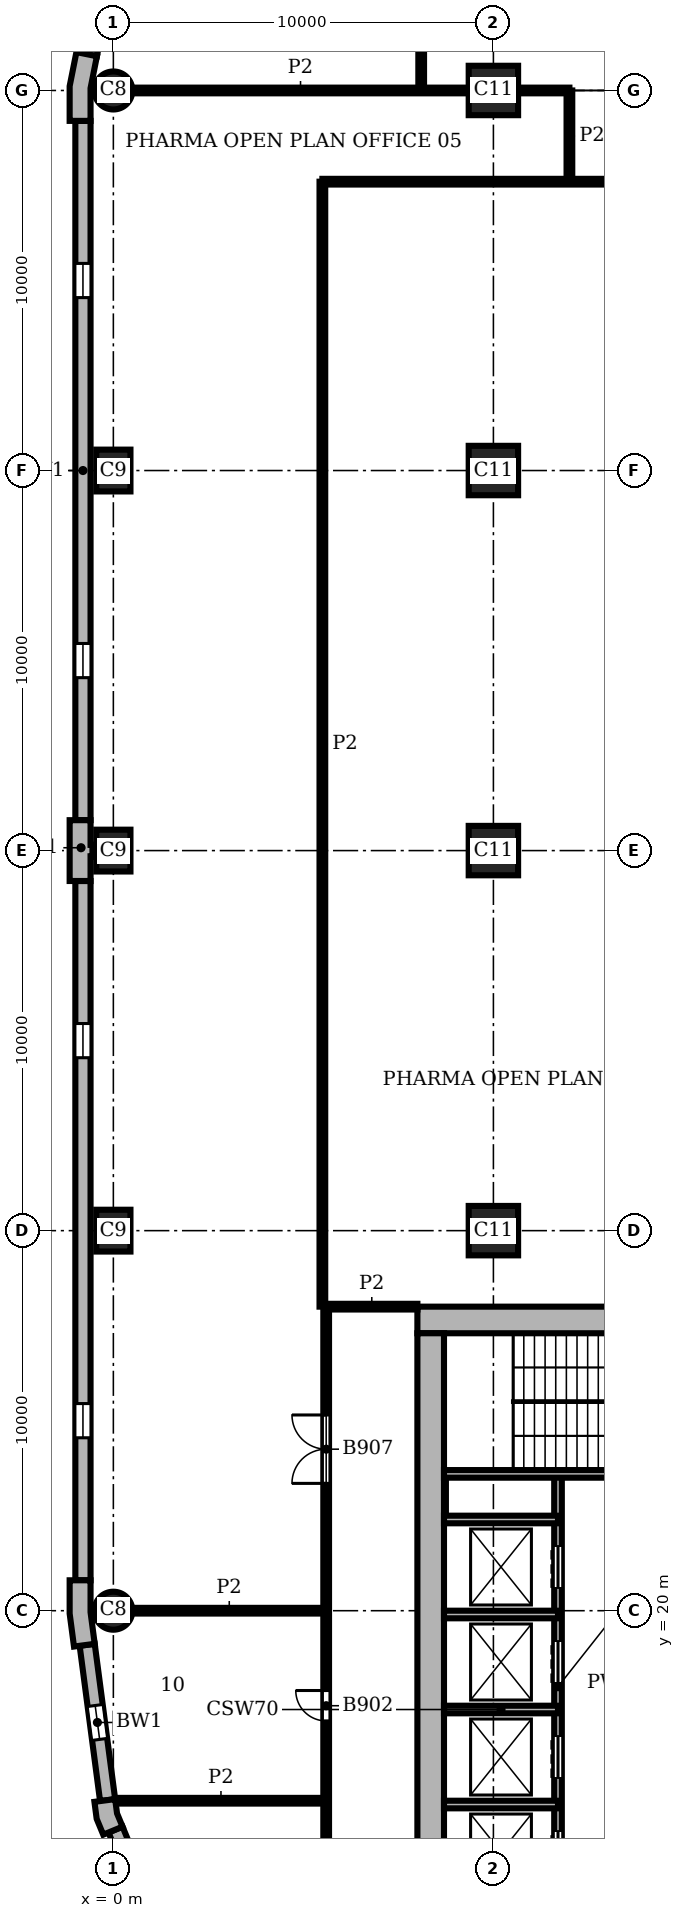
"""IFC4 building model, lengths in metres.
Left out: names, types, materials, properties, quantities, classifications, styles, units other than length and angle.
Written with IfcOpenShell. Run it as: python <this file> out.ifc"""

import sys

from ifc_helpers import new_model, si_unit, direction, frame, frame_2d, origin, origin_2d, place, context, subcontext, project, spatial, polyline, rectangle, circle, outline, extrude, element, fill, save


model = new_model("IFC4")
c1 = context("Model", 3, precision=1e-05, world=origin(), true_north=direction((0.0, 1.0)))
c2 = subcontext(c1, "Body", "Model", "MODEL_VIEW")
j1 = project(units=[si_unit("LENGTHUNIT", "METRE"), si_unit("PLANEANGLEUNIT", "RADIAN")], contexts=[c1])
p1 = place(None, origin())
s1 = spatial("IfcSite", under=j1, at=p1, CompositionType="ELEMENT")
p2 = place(p1, origin())
s2 = spatial("IfcBuilding", under=s1, at=p2, CompositionType="ELEMENT")
p3 = place(p2, frame((0.0, 0.0, 225.3)))
s3 = spatial("IfcBuildingStorey", under=s2, at=p3, CompositionType="ELEMENT", Elevation=225.3)
p4 = place(p3, frame((0.0, 60.0, 0.0), z_axis=(0.0, 0.0, 1.0), x_axis=(1.0, 0.0, 0.0)))
e1 = element("IfcColumn", 1, at=p4, inside=s3, PredefinedType="COLUMN", context=c2, shape_type="SweptSolid", body=[
    extrude(circle(Radius=0.5, at=origin_2d()), origin(), (0.0, 0.0, 1.0), 3.9),
])
for number, where, z_axis, x_axis in (
    (2, (0.0, 50.0, 0.0), (0.0, 0.0, 1.0), (0.0, 1.0, 0.0)),
    (3, (0.0, 40.0, 0.0), (0.0, 0.0, 1.0), (0.0, 1.0, 0.0)),
    (4, (0.0, 30.0, 0.0), (0.0, 0.0, 1.0), (0.0, 1.0, 0.0)),
):
    element("IfcColumn", number, at=place(p3, frame(where, z_axis=z_axis, x_axis=x_axis)), inside=s3, PredefinedType="COLUMN", context=c2, shape_type="SweptSolid", body=[
        extrude(rectangle(XDim=1.1, YDim=0.9, at=origin_2d()), origin(), (0.0, 0.0, 1.0), 3.9),
    ])
p5 = place(p3, frame((0.0, 20.0, 0.0), z_axis=(0.0, 0.0, 1.0), x_axis=(1.0, 0.0, 0.0)))
e5 = element("IfcColumn", 5, at=p5, inside=s3, PredefinedType="COLUMN", context=c2, shape_type="SweptSolid", body=[
    extrude(circle(Radius=0.5, at=origin_2d()), origin(), (0.0, 0.0, 1.0), 3.9),
])
for number, where, z_axis, x_axis in (
    (6, (10.0, 30.0, 0.0), (0.0, 0.0, 1.0), (1.0, 0.0, 0.0)),
    (7, (10.0, 40.0, 0.0), (0.0, 0.0, 1.0), (1.0, 0.0, 0.0)),
    (8, (10.0, 50.0, 0.0), (0.0, 0.0, 1.0), (1.0, 0.0, 0.0)),
    (9, (10.0, 60.0, 0.0), (0.0, 0.0, 1.0), (1.0, 0.0, 0.0)),
):
    element("IfcColumn", number, at=place(p3, frame(where, z_axis=z_axis, x_axis=x_axis)), inside=s3, PredefinedType="COLUMN", context=c2, shape_type="SweptSolid", body=[
        extrude(rectangle(XDim=1.3, YDim=1.3, at=origin_2d()), origin(), (0.0, 0.0, 1.0), 3.9),
    ])
p6 = place(p3, frame((28.0, 27.65, 0.0), z_axis=(0.0, 0.0, 1.0), x_axis=(-1.0, 0.0, 0.0)))
e10 = element("IfcWall", 10, at=p6, inside=s3, PredefinedType="SHEAR", context=c2, shape_type="SweptSolid", body=[
    extrude(rectangle(XDim=20.0, YDim=0.7, at=frame_2d((10.0, 0.0))), origin(), (0.0, 0.0, 1.0), 3.9),
])
p7 = place(p3, frame((8.35, 27.3, 0.0), z_axis=(0.0, 0.0, 1.0), x_axis=(0.0, -1.0, 0.0)))
e11 = element("IfcWall", 11, at=p7, inside=s3, PredefinedType="SHEAR", context=c2, shape_type="SweptSolid", body=[
    extrude(rectangle(XDim=18.6, YDim=0.7, at=frame_2d((9.3, 0.0))), origin(), (0.0, 0.0, 1.0), 3.9),
])
p8 = place(p3, origin())
e12 = element("IfcWall", 12, at=p8, inside=s3, PredefinedType="SOLIDWALL", context=c2, shape_type="SweptSolid", body=[
    extrude(outline(polyline([(-0.825, 60.98), (-0.972, 61.009), (-1.15, 60.113), (-1.15, 59.2), (-1.0, 59.2), (-0.6, 59.2), (-0.6, 60.059), (-0.432, 60.902), (-0.825, 60.98)])), origin(), (0.0, 0.0, 1.0), 3.9),
])
e13 = element("IfcWall", 13, at=p8, inside=s3, PredefinedType="SOLIDWALL", context=c2, shape_type="SweptSolid", body=[
    extrude(outline(polyline([(-0.6, 39.2), (-0.6, 39.85), (-0.55, 39.85), (-0.55, 40.15), (-0.6, 40.15), (-0.6, 40.8), (-1.0, 40.8), (-1.15, 40.8), (-1.15, 40.0), (-1.15, 39.2), (-1.0, 39.2), (-0.6, 39.2)])), origin(), (0.0, 0.0, 1.0), 3.9),
])
e14 = element("IfcWall", 14, at=p8, inside=s3, PredefinedType="SOLIDWALL", context=c2, shape_type="SweptSolid", body=[
    extrude(outline(polyline([(-1.0, 20.8), (-1.15, 20.8), (-1.15, 19.925), (-1.036, 19.057), (-0.887, 19.076), (-0.49, 19.128), (-0.6, 19.961), (-0.6, 20.8), (-1.0, 20.8)])), origin(), (0.0, 0.0, 1.0), 3.9),
])
e15 = element("IfcWall", 15, at=p8, inside=s3, PredefinedType="SOLIDWALL", context=c2, shape_type="SweptSolid", body=[
    extrude(outline(polyline([(-0.349, 14.99), (-0.498, 14.971), (-0.439, 14.523), (-0.266, 14.106), (-0.128, 14.164), (0.242, 14.317), (0.097, 14.667), (0.047, 15.043), (-0.349, 14.99)])), origin(), (0.0, 0.0, 1.0), 3.9),
])
p9 = place(p3, frame((0.299, 65.602, 0.0), z_axis=(0.0, 0.0, 1.0), x_axis=(-0.195098533057, -0.98078364709, 0.0)))
e16 = element("IfcWall", 16, at=p9, inside=s3, PredefinedType="SOLIDWALL", context=c2, shape_type="SweptSolid", body=[
    extrude(rectangle(XDim=4.753, YDim=0.4, at=frame_2d((2.376, 0.0))), origin(), (0.0, 0.0, 1.0), 3.9),
])
p10 = place(p9, frame((0.226, 0.0, 0.9)))
e17 = element("IfcOpeningElement", 17, at=p10, cuts=e16, PredefinedType="OPENING", context=c2, shape_type="SweptSolid", body=[
    extrude(rectangle(XDim=4.3, YDim=2.35, at=frame_2d((2.15, 1.175))), frame((0.0, 0.21, 0.0), z_axis=(0.0, -1.0, 0.0), x_axis=(1.0, 0.0, 0.0)), (0.0, 0.0, 1.0), 0.42),
])
p11 = place(p3, frame((-0.8, 59.2, 0.0), z_axis=(0.0, 0.0, 1.0), x_axis=(0.0, -1.0, 0.0)))
e18 = element("IfcWall", 18, at=p11, inside=s3, PredefinedType="SOLIDWALL", context=c2, shape_type="SweptSolid", body=[
    extrude(rectangle(XDim=18.4, YDim=0.4, at=frame_2d((9.2, 0.0))), origin(), (0.0, 0.0, 1.0), 3.9),
])
p12 = place(p11, frame((3.75, 0.0, 0.9)))
e19 = element("IfcOpeningElement", 19, at=p12, cuts=e18, PredefinedType="OPENING", context=c2, shape_type="SweptSolid", body=[
    extrude(rectangle(XDim=0.9, YDim=2.35, at=frame_2d((0.45, 1.175))), frame((0.0, 0.21, 0.0), z_axis=(0.0, -1.0, 0.0), x_axis=(1.0, 0.0, 0.0)), (0.0, 0.0, 1.0), 0.42),
])
p13 = place(p11, frame((13.75, 0.0, 0.9)))
e20 = element("IfcOpeningElement", 20, at=p13, cuts=e18, PredefinedType="OPENING", context=c2, shape_type="SweptSolid", body=[
    extrude(rectangle(XDim=0.9, YDim=2.35, at=frame_2d((0.45, 1.175))), frame((0.0, 0.21, 0.0), z_axis=(0.0, -1.0, 0.0), x_axis=(1.0, 0.0, 0.0)), (0.0, 0.0, 1.0), 0.42),
])
p14 = place(p3, frame((-0.8, 39.2, 0.0), z_axis=(0.0, 0.0, 1.0), x_axis=(0.0, -1.0, 0.0)))
e21 = element("IfcWall", 21, at=p14, inside=s3, PredefinedType="SOLIDWALL", context=c2, shape_type="SweptSolid", body=[
    extrude(rectangle(XDim=18.4, YDim=0.4, at=frame_2d((9.2, 0.0))), origin(), (0.0, 0.0, 1.0), 3.9),
])
p15 = place(p14, frame((3.75, 0.0, 0.9)))
e22 = element("IfcOpeningElement", 22, at=p15, cuts=e21, PredefinedType="OPENING", context=c2, shape_type="SweptSolid", body=[
    extrude(rectangle(XDim=0.9, YDim=2.35, at=frame_2d((0.45, 1.175))), frame((0.0, 0.21, 0.0), z_axis=(0.0, -1.0, 0.0), x_axis=(1.0, 0.0, 0.0)), (0.0, 0.0, 1.0), 0.42),
])
p16 = place(p14, frame((13.75, 0.0, 0.9)))
e23 = element("IfcOpeningElement", 23, at=p16, cuts=e21, PredefinedType="OPENING", context=c2, shape_type="SweptSolid", body=[
    extrude(rectangle(XDim=0.9, YDim=2.35, at=frame_2d((0.45, 1.175))), frame((0.0, 0.21, 0.0), z_axis=(0.0, -1.0, 0.0), x_axis=(1.0, 0.0, 0.0)), (0.0, 0.0, 1.0), 0.42),
])
p17 = place(p3, frame((-0.689, 19.102, 0.0), z_axis=(0.0, 0.0, 1.0), x_axis=(0.130514280502, -0.991446429508, 0.0)))
e24 = element("IfcWall", 24, at=p17, inside=s3, PredefinedType="SOLIDWALL", context=c2, shape_type="SweptSolid", body=[
    extrude(rectangle(XDim=4.121, YDim=0.4, at=frame_2d((2.061, 0.0))), origin(), (0.0, 0.0, 1.0), 3.9),
])
p18 = place(p17, frame((1.611, 0.0, 0.9)))
e25 = element("IfcOpeningElement", 25, at=p18, cuts=e24, PredefinedType="OPENING", context=c2, shape_type="SweptSolid", body=[
    extrude(rectangle(XDim=0.9, YDim=2.35, at=frame_2d((0.45, 1.175))), frame((0.0, 0.21, 0.0), z_axis=(0.0, -1.0, 0.0), x_axis=(1.0, 0.0, 0.0)), (0.0, 0.0, 1.0), 0.42),
])
p19 = place(p3, frame((0.057, 14.24, 0.0), z_axis=(0.0, 0.0, 1.0), x_axis=(0.382721546029, -0.923863744394, 0.0)))
e26 = element("IfcWall", 26, at=p19, inside=s3, PredefinedType="SOLIDWALL", context=c2, shape_type="SweptSolid", body=[
    extrude(rectangle(XDim=4.121, YDim=0.4, at=frame_2d((2.061, 0.0))), origin(), (0.0, 0.0, 1.0), 3.9),
])
p20 = place(p19, frame((1.611, 0.0, 0.9)))
e27 = element("IfcOpeningElement", 27, at=p20, cuts=e26, PredefinedType="OPENING", context=c2, shape_type="SweptSolid", body=[
    extrude(rectangle(XDim=0.9, YDim=2.35, at=frame_2d((0.45, 1.175))), frame((0.0, 0.21, 0.0), z_axis=(0.0, -1.0, 0.0), x_axis=(1.0, 0.0, 0.0)), (0.0, 0.0, 1.0), 0.42),
])
for number, where, z_axis, x_axis in (
    (28, (8.7, 14.9, 0.0), (0.0, 0.0, 1.0), (1.0, 0.0, 0.0)),
    (29, (8.7, 17.4, 0.0), (0.0, 0.0, 1.0), (1.0, 0.0, 0.0)),
    (30, (8.7, 19.9, 0.0), (0.0, 0.0, 1.0), (1.0, 0.0, 0.0)),
    (31, (8.7, 22.4, 0.0), (0.0, 0.0, 1.0), (1.0, 0.0, 0.0)),
):
    element("IfcWall", number, at=place(p3, frame(where, z_axis=z_axis, x_axis=x_axis)), inside=s3, PredefinedType="SHEAR", context=c2, shape_type="SweptSolid", body=[
        extrude(rectangle(XDim=3.0, YDim=0.2, at=frame_2d((1.5, 0.0))), origin(), (0.0, 0.0, 1.0), 3.58),
    ])
p21 = place(p3, frame((8.7, 23.6, 0.0), z_axis=(0.0, 0.0, 1.0), x_axis=(1.0, 0.0, 0.0)))
e32 = element("IfcWall", 32, at=p21, inside=s3, PredefinedType="SHEAR", context=c2, shape_type="SweptSolid", body=[
    extrude(rectangle(XDim=5.1, YDim=0.2, at=frame_2d((2.55, 0.0))), origin(), (0.0, 0.0, 1.0), 3.58),
])
p22 = place(p3, frame((11.7, 12.4, 0.0), z_axis=(0.0, 0.0, 1.0), x_axis=(0.0, 1.0, 0.0)))
e33 = element("IfcWall", 33, at=p22, inside=s3, PredefinedType="SHEAR", context=c2, shape_type="SweptSolid", body=[
    extrude(rectangle(XDim=11.2, YDim=0.2, at=frame_2d((5.6, 0.0))), origin(), (0.0, 0.0, 1.0), 3.58),
])
p23 = place(p22, frame((0.7, 0.0, 0.0)))
e34 = element("IfcOpeningElement", 34, at=p23, cuts=e33, PredefinedType="OPENING", context=c2, shape_type="SweptSolid", body=[
    extrude(rectangle(XDim=1.1, YDim=2.1, at=frame_2d((0.55, 1.05))), frame((0.0, 0.11, 0.0), z_axis=(0.0, -1.0, 0.0), x_axis=(1.0, 0.0, 0.0)), (0.0, 0.0, 1.0), 0.22),
])
p24 = place(p22, frame((3.2, 0.0, 0.0)))
e35 = element("IfcOpeningElement", 35, at=p24, cuts=e33, PredefinedType="OPENING", context=c2, shape_type="SweptSolid", body=[
    extrude(rectangle(XDim=1.1, YDim=2.1, at=frame_2d((0.55, 1.05))), frame((0.0, 0.11, 0.0), z_axis=(0.0, -1.0, 0.0), x_axis=(1.0, 0.0, 0.0)), (0.0, 0.0, 1.0), 0.22),
])
p25 = place(p22, frame((5.7, 0.0, 0.0)))
e36 = element("IfcOpeningElement", 36, at=p25, cuts=e33, PredefinedType="OPENING", context=c2, shape_type="SweptSolid", body=[
    extrude(rectangle(XDim=1.1, YDim=2.1, at=frame_2d((0.55, 1.05))), frame((0.0, 0.11, 0.0), z_axis=(0.0, -1.0, 0.0), x_axis=(1.0, 0.0, 0.0)), (0.0, 0.0, 1.0), 0.22),
])
p26 = place(p22, frame((8.2, 0.0, 0.0)))
e37 = element("IfcOpeningElement", 37, at=p26, cuts=e33, PredefinedType="OPENING", context=c2, shape_type="SweptSolid", body=[
    extrude(rectangle(XDim=1.1, YDim=2.1, at=frame_2d((0.55, 1.05))), frame((0.0, 0.11, 0.0), z_axis=(0.0, -1.0, 0.0), x_axis=(1.0, 0.0, 0.0)), (0.0, 0.0, 1.0), 0.22),
])
p27 = place(p3, frame((5.5, 28.0, 0.0), z_axis=(0.0, 0.0, 1.0), x_axis=(0.0, 1.0, 0.0)))
e38 = element("IfcWall", 38, at=p27, inside=s3, PredefinedType="PARTITIONING", context=c2, shape_type="SweptSolid", body=[
    extrude(rectangle(XDim=29.6, YDim=0.15, at=frame_2d((14.8, 0.0))), origin(), (0.0, 0.0, 1.0), 3.58),
])
p28 = place(p3, frame((5.6, 5.6, 0.0), z_axis=(0.0, 0.0, 1.0), x_axis=(0.0, 1.0, 0.0)))
e39 = element("IfcWall", 39, at=p28, inside=s3, PredefinedType="PARTITIONING", context=c2, shape_type="SweptSolid", body=[
    extrude(rectangle(XDim=22.4, YDim=0.15, at=frame_2d((11.2, 0.0))), origin(), (0.0, 0.0, 1.0), 3.58),
])
p29 = place(p28, frame((5.35, 0.0, 0.0)))
e40 = element("IfcOpeningElement", 40, at=p29, cuts=e39, PredefinedType="OPENING", context=c2, shape_type="SweptSolid", body=[
    extrude(rectangle(XDim=0.8, YDim=2.1, at=frame_2d((0.4, 1.05))), frame((0.0, 0.085, 0.0), z_axis=(0.0, -1.0, 0.0), x_axis=(1.0, 0.0, 0.0)), (0.0, 0.0, 1.0), 0.17),
])
p30 = place(p28, frame((11.5, 0.0, 0.0)))
e41 = element("IfcOpeningElement", 41, at=p30, cuts=e39, PredefinedType="OPENING", context=c2, shape_type="SweptSolid", body=[
    extrude(rectangle(XDim=0.8, YDim=2.1, at=frame_2d((0.4, 1.05))), frame((0.0, 0.085, 0.0), z_axis=(0.0, -1.0, 0.0), x_axis=(1.0, 0.0, 0.0)), (0.0, 0.0, 1.0), 0.17),
])
p31 = place(p28, frame((17.75, 0.0, 0.0)))
e42 = element("IfcOpeningElement", 42, at=p31, cuts=e39, PredefinedType="OPENING", context=c2, shape_type="SweptSolid", body=[
    extrude(rectangle(XDim=1.8, YDim=2.1, at=frame_2d((0.9, 1.05))), frame((0.0, 0.085, 0.0), z_axis=(0.0, -1.0, 0.0), x_axis=(1.0, 0.0, 0.0)), (0.0, 0.0, 1.0), 0.17),
])
p32 = place(p3, frame((8.1, 60.0, 0.0), z_axis=(0.0, 0.0, 1.0), x_axis=(0.0, 1.0, 0.0)))
e43 = element("IfcWall", 43, at=p32, inside=s3, PredefinedType="PARTITIONING", context=c2, shape_type="SweptSolid", body=[
    extrude(rectangle(XDim=6.4, YDim=0.15, at=frame_2d((3.2, 0.0))), origin(), (0.0, 0.0, 1.0), 3.58),
])
p33 = place(p32, frame((2.35, 0.0, 0.0)))
e44 = element("IfcOpeningElement", 44, at=p33, cuts=e43, PredefinedType="OPENING", context=c2, shape_type="SweptSolid", body=[
    extrude(rectangle(XDim=1.0, YDim=2.1, at=frame_2d((0.5, 1.05))), frame((0.0, 0.085, 0.0), z_axis=(0.0, -1.0, 0.0), x_axis=(1.0, 0.0, 0.0)), (0.0, 0.0, 1.0), 0.17),
])
p34 = place(p3, frame((12.0, 57.6, 0.0), z_axis=(0.0, 0.0, 1.0), x_axis=(0.0, 1.0, 0.0)))
e45 = element("IfcWall", 45, at=p34, inside=s3, PredefinedType="PARTITIONING", context=c2, shape_type="SweptSolid", body=[
    extrude(rectangle(XDim=2.4, YDim=0.15, at=frame_2d((1.2, 0.0))), origin(), (0.0, 0.0, 1.0), 3.58),
])
p35 = place(p3, frame((0.063, 15.0, 0.0), z_axis=(0.0, 0.0, 1.0), x_axis=(1.0, 0.0, 0.0)))
e46 = element("IfcWall", 46, at=p35, inside=s3, PredefinedType="PARTITIONING", context=c2, shape_type="SweptSolid", body=[
    extrude(rectangle(XDim=5.537, YDim=0.15, at=frame_2d((2.769, 0.0))), origin(), (0.0, 0.0, 1.0), 3.58),
])
p36 = place(p3, frame((0.5, 20.0, 0.0), z_axis=(0.0, 0.0, 1.0), x_axis=(1.0, 0.0, 0.0)))
e47 = element("IfcWall", 47, at=p36, inside=s3, PredefinedType="PARTITIONING", context=c2, shape_type="SweptSolid", body=[
    extrude(rectangle(XDim=5.1, YDim=0.15, at=frame_2d((2.55, 0.0))), origin(), (0.0, 0.0, 1.0), 3.58),
])
p37 = place(p3, frame((5.6, 28.0, 0.0), z_axis=(0.0, 0.0, 1.0), x_axis=(1.0, 0.0, 0.0)))
e48 = element("IfcWall", 48, at=p37, inside=s3, PredefinedType="PARTITIONING", context=c2, shape_type="SweptSolid", body=[
    extrude(rectangle(XDim=2.4, YDim=0.15, at=frame_2d((1.2, 0.0))), origin(), (0.0, 0.0, 1.0), 3.58),
])
p38 = place(p3, frame((5.5, 57.6, 0.0), z_axis=(0.0, 0.0, 1.0), x_axis=(1.0, 0.0, 0.0)))
e49 = element("IfcWall", 49, at=p38, inside=s3, PredefinedType="PARTITIONING", context=c2, shape_type="SweptSolid", body=[
    extrude(rectangle(XDim=20.5, YDim=0.15, at=frame_2d((10.25, 0.0))), origin(), (0.0, 0.0, 1.0), 3.58),
])
p39 = place(p38, frame((8.1, 0.0, 0.0)))
e50 = element("IfcOpeningElement", 50, at=p39, cuts=e49, PredefinedType="OPENING", context=c2, shape_type="SweptSolid", body=[
    extrude(rectangle(XDim=1.8, YDim=2.1, at=frame_2d((0.9, 1.05))), frame((0.0, 0.085, 0.0), z_axis=(0.0, -1.0, 0.0), x_axis=(1.0, 0.0, 0.0)), (0.0, 0.0, 1.0), 0.17),
])
p40 = place(p3, frame((0.5, 60.0, 0.0), z_axis=(0.0, 0.0, 1.0), x_axis=(1.0, 0.0, 0.0)))
e51 = element("IfcWall", 51, at=p40, inside=s3, PredefinedType="PARTITIONING", context=c2, shape_type="SweptSolid", body=[
    extrude(rectangle(XDim=8.85, YDim=0.15, at=frame_2d((4.425, 0.0))), origin(), (0.0, 0.0, 1.0), 3.58),
])
p41 = place(p3, frame((10.65, 60.0, 0.0), z_axis=(0.0, 0.0, 1.0), x_axis=(1.0, 0.0, 0.0)))
e52 = element("IfcWall", 52, at=p41, inside=s3, PredefinedType="PARTITIONING", context=c2, shape_type="SweptSolid", body=[
    extrude(rectangle(XDim=1.35, YDim=0.15, at=frame_2d((0.675, 0.0))), origin(), (0.0, 0.0, 1.0), 3.58),
])
p42 = place(p12, origin())
e53 = element("IfcWindow", 53, at=p42, inside=s3, PartitioningType="SINGLE_PANEL", PredefinedType="WINDOW", context=c2, shape_type="SweptSolid", body=[
    extrude(rectangle(XDim=0.9, YDim=2.35, at=frame_2d((0.45, 1.175))), frame((0.0, 0.16, 0.0), z_axis=(0.0, -1.0, 0.0), x_axis=(1.0, 0.0, 0.0)), (0.0, 0.0, 1.0), 0.06),
])
fill(e19, e53)
p43 = place(p13, origin())
e54 = element("IfcWindow", 54, at=p43, inside=s3, PartitioningType="SINGLE_PANEL", PredefinedType="WINDOW", context=c2, shape_type="SweptSolid", body=[
    extrude(rectangle(XDim=0.9, YDim=2.35, at=frame_2d((0.45, 1.175))), frame((0.0, 0.16, 0.0), z_axis=(0.0, -1.0, 0.0), x_axis=(1.0, 0.0, 0.0)), (0.0, 0.0, 1.0), 0.06),
])
fill(e20, e54)
p44 = place(p15, origin())
e55 = element("IfcWindow", 55, at=p44, inside=s3, PartitioningType="SINGLE_PANEL", PredefinedType="WINDOW", context=c2, shape_type="SweptSolid", body=[
    extrude(rectangle(XDim=0.9, YDim=2.35, at=frame_2d((0.45, 1.175))), frame((0.0, 0.16, 0.0), z_axis=(0.0, -1.0, 0.0), x_axis=(1.0, 0.0, 0.0)), (0.0, 0.0, 1.0), 0.06),
])
fill(e22, e55)
p45 = place(p16, origin())
e56 = element("IfcWindow", 56, at=p45, inside=s3, PartitioningType="SINGLE_PANEL", PredefinedType="WINDOW", context=c2, shape_type="SweptSolid", body=[
    extrude(rectangle(XDim=0.9, YDim=2.35, at=frame_2d((0.45, 1.175))), frame((0.0, 0.16, 0.0), z_axis=(0.0, -1.0, 0.0), x_axis=(1.0, 0.0, 0.0)), (0.0, 0.0, 1.0), 0.06),
])
fill(e23, e56)
p46 = place(p18, origin())
e57 = element("IfcWindow", 57, at=p46, inside=s3, PartitioningType="SINGLE_PANEL", PredefinedType="WINDOW", context=c2, shape_type="SweptSolid", body=[
    extrude(rectangle(XDim=0.9, YDim=2.35, at=frame_2d((0.45, 1.175))), frame((0.0, 0.16, 0.0), z_axis=(0.0, -1.0, 0.0), x_axis=(1.0, 0.0, 0.0)), (0.0, 0.0, 1.0), 0.06),
])
fill(e25, e57)
p47 = place(p23, origin())
e58 = element("IfcDoor", 58, at=p47, inside=s3, OperationType="DOUBLE_DOOR_SLIDING", PredefinedType="DOOR", context=c2, shape_type="SweptSolid", body=[
    extrude(rectangle(XDim=1.1, YDim=2.1, at=frame_2d((0.55, 1.05))), frame((0.0, 0.025, 0.0), z_axis=(0.0, -1.0, 0.0), x_axis=(1.0, 0.0, 0.0)), (0.0, 0.0, 1.0), 0.05),
])
fill(e34, e58)
p48 = place(p24, origin())
e59 = element("IfcDoor", 59, at=p48, inside=s3, OperationType="DOUBLE_DOOR_SLIDING", PredefinedType="DOOR", context=c2, shape_type="SweptSolid", body=[
    extrude(rectangle(XDim=1.1, YDim=2.1, at=frame_2d((0.55, 1.05))), frame((0.0, 0.025, 0.0), z_axis=(0.0, -1.0, 0.0), x_axis=(1.0, 0.0, 0.0)), (0.0, 0.0, 1.0), 0.05),
])
fill(e35, e59)
p49 = place(p25, origin())
e60 = element("IfcDoor", 60, at=p49, inside=s3, OperationType="DOUBLE_DOOR_SLIDING", PredefinedType="DOOR", context=c2, shape_type="SweptSolid", body=[
    extrude(rectangle(XDim=1.1, YDim=2.1, at=frame_2d((0.55, 1.05))), frame((0.0, 0.025, 0.0), z_axis=(0.0, -1.0, 0.0), x_axis=(1.0, 0.0, 0.0)), (0.0, 0.0, 1.0), 0.05),
])
fill(e36, e60)
p50 = place(p26, origin())
e61 = element("IfcDoor", 61, at=p50, inside=s3, OperationType="DOUBLE_DOOR_SLIDING", PredefinedType="DOOR", context=c2, shape_type="SweptSolid", body=[
    extrude(rectangle(XDim=1.1, YDim=2.1, at=frame_2d((0.55, 1.05))), frame((0.0, 0.025, 0.0), z_axis=(0.0, -1.0, 0.0), x_axis=(1.0, 0.0, 0.0)), (0.0, 0.0, 1.0), 0.05),
])
fill(e37, e61)
p51 = place(p30, origin())
e62 = element("IfcDoor", 62, at=p51, inside=s3, OperationType="SINGLE_SWING_RIGHT", PredefinedType="DOOR", context=c2, shape_type="SweptSolid", body=[
    extrude(rectangle(XDim=0.8, YDim=2.1, at=frame_2d((0.4, 1.05))), frame((0.0, 0.025, 0.0), z_axis=(0.0, -1.0, 0.0), x_axis=(1.0, 0.0, 0.0)), (0.0, 0.0, 1.0), 0.05),
])
fill(e41, e62)
p52 = place(p31, origin())
e63 = element("IfcDoor", 63, at=p52, inside=s3, OperationType="DOUBLE_DOOR_SINGLE_SWING", PredefinedType="DOOR", context=c2, shape_type="SweptSolid", body=[
    extrude(rectangle(XDim=1.8, YDim=2.1, at=frame_2d((0.9, 1.05))), frame((0.0, 0.025, 0.0), z_axis=(0.0, -1.0, 0.0), x_axis=(1.0, 0.0, 0.0)), (0.0, 0.0, 1.0), 0.05),
])
fill(e42, e63)
save(model, sys.argv[1])
